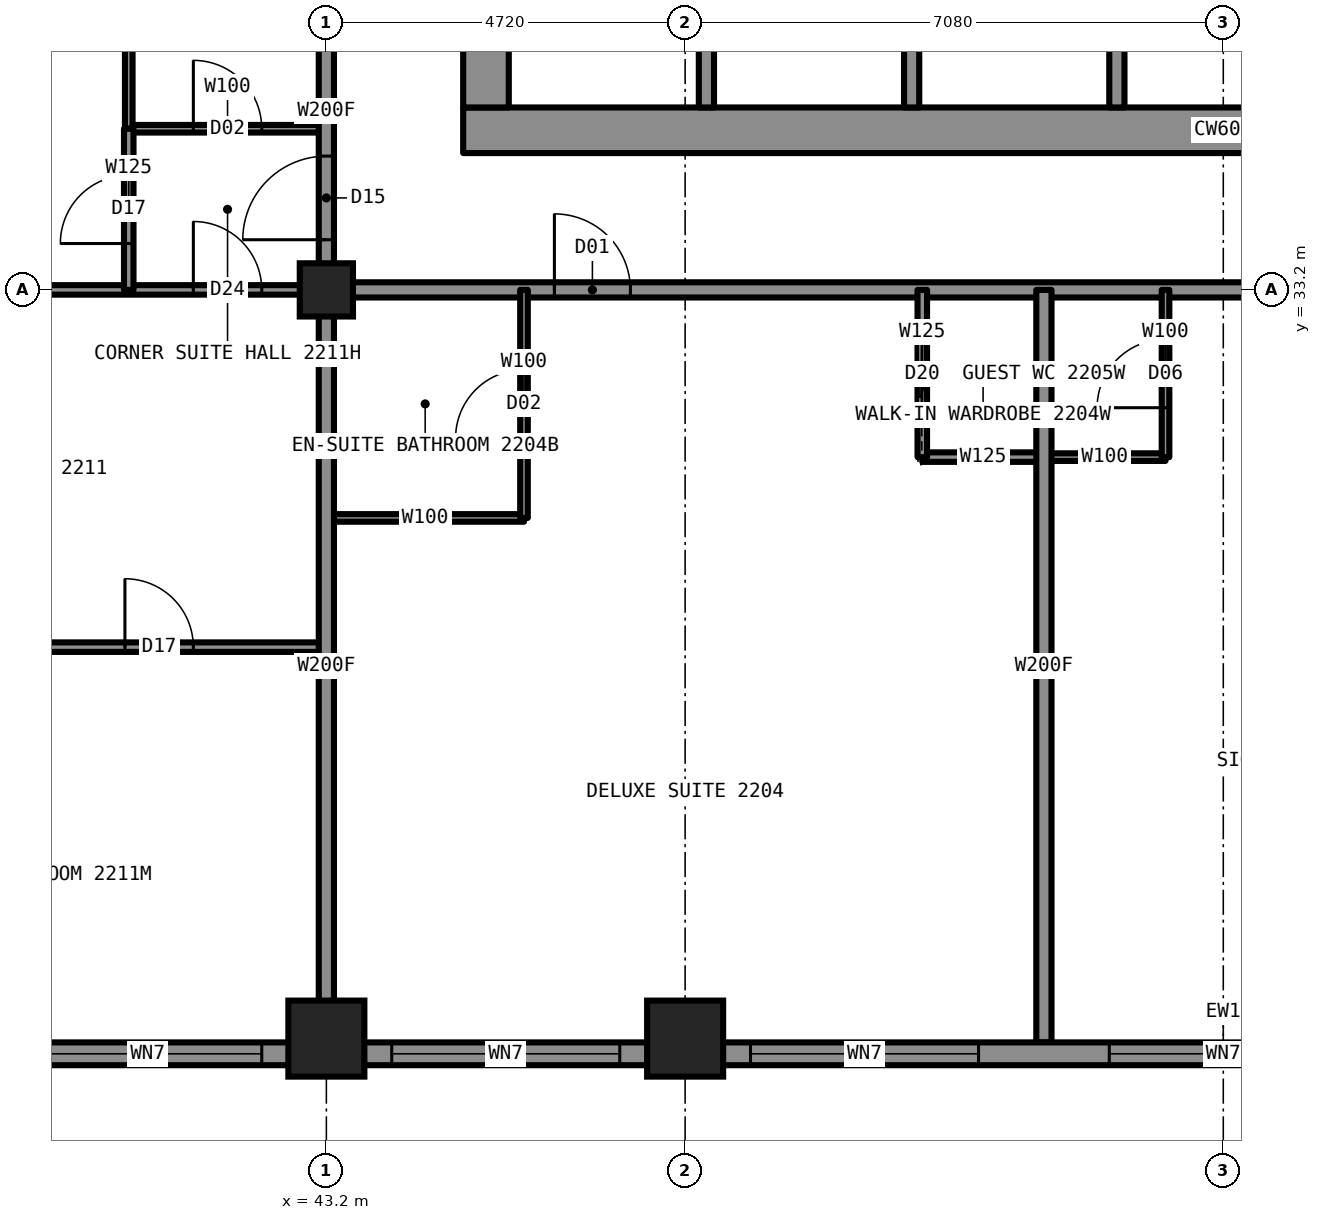
"""IFC4 building model, lengths in metres.
Left out: names, types, materials, properties, quantities, classifications, styles, units other than length and angle.
Written with IfcOpenShell. Run it as: python <this file> out.ifc"""

import sys

from ifc_helpers import new_model, si_unit, direction, frame, frame_2d, origin, origin_2d, place, context, subcontext, project, spatial, rectangle, hollow_rectangle, i_section, extrude, element, fill, save


model = new_model("IFC4")
c1 = context("Model", 3, precision=1e-05, world=origin(), true_north=direction((0.0, 1.0)))
c2 = subcontext(c1, "Body", "Model", "MODEL_VIEW")
j1 = project(units=[si_unit("LENGTHUNIT", "METRE"), si_unit("PLANEANGLEUNIT", "RADIAN")], contexts=[c1])
p1 = place(None, origin())
s1 = spatial("IfcSite", under=j1, at=p1, CompositionType="ELEMENT")
p2 = place(p1, origin())
s2 = spatial("IfcBuilding", under=s1, at=p2, CompositionType="ELEMENT")
p3 = place(p2, frame((0.0, 0.0, 81.0)))
s3 = spatial("IfcBuildingStorey", under=s2, at=p3, CompositionType="ELEMENT", Elevation=81.0)
for number, where, z_axis, x_axis in (
    (1, (43.2, 23.35, 0.0), (0.0, 0.0, 1.0), (1.0, 0.0, 0.0)),
    (2, (47.92, 23.35, 0.0), (0.0, 0.0, 1.0), (1.0, 0.0, 0.0)),
):
    element("IfcColumn", number, at=place(p3, frame(where, z_axis=z_axis, x_axis=x_axis)), inside=s3, PredefinedType="COLUMN", context=c2, shape_type="SweptSolid", body=[
        extrude(i_section(OverallWidth=0.432, OverallDepth=0.498, WebThickness=0.056, FlangeThickness=0.089, at=origin_2d()), origin(), (0.0, 0.0, 1.0), 3.5),
    ])
p4 = place(p3, frame((43.2, 33.2, 0.0), z_axis=(0.0, 0.0, 1.0), x_axis=(1.0, 0.0, 0.0)))
e3 = element("IfcColumn", 3, at=p4, inside=s3, PredefinedType="COLUMN", context=c2, shape_type="SweptSolid", body=[
    extrude(hollow_rectangle(XDim=0.7, YDim=0.7, WallThickness=0.06, at=origin_2d()), origin(), (0.0, 0.0, 1.0), 3.5),
])
p5 = place(p3, frame((45.0, 35.3, 0.0), z_axis=(0.0, 0.0, 1.0), x_axis=(1.0, 0.0, 0.0)))
e4 = element("IfcWall", 4, at=p5, inside=s3, PredefinedType="SHEAR", context=c2, shape_type="SweptSolid", body=[
    extrude(rectangle(XDim=20.0, YDim=0.6, at=frame_2d((10.0, 0.0))), origin(), (0.0, 0.0, 1.0), 3.5),
])
p6 = place(p3, frame((45.3, 35.6, 0.0), z_axis=(0.0, 0.0, 1.0), x_axis=(0.0, 1.0, 0.0)))
e5 = element("IfcWall", 5, at=p6, inside=s3, PredefinedType="SHEAR", context=c2, shape_type="SweptSolid", body=[
    extrude(rectangle(XDim=18.8, YDim=0.6, at=frame_2d((9.4, 0.0))), origin(), (0.0, 0.0, 1.0), 3.5),
])
p7 = place(p6, frame((13.4, 0.0, 0.0)))
e6 = element("IfcOpeningElement", 6, at=p7, cuts=e5, PredefinedType="OPENING", context=c2, shape_type="SweptSolid", body=[
    extrude(rectangle(XDim=1.8, YDim=2.2, at=frame_2d((0.9, 1.1))), frame((0.0, 0.31, 0.0), z_axis=(0.0, -1.0, 0.0), x_axis=(1.0, 0.0, 0.0)), (0.0, 0.0, 1.0), 0.62),
])
p8 = place(p6, frame((3.6, 0.0, 0.0)))
e7 = element("IfcOpeningElement", 7, at=p8, cuts=e5, PredefinedType="OPENING", context=c2, shape_type="SweptSolid", body=[
    extrude(rectangle(XDim=1.8, YDim=2.2, at=frame_2d((0.9, 1.1))), frame((0.0, 0.31, 0.0), z_axis=(0.0, -1.0, 0.0), x_axis=(1.0, 0.0, 0.0)), (0.0, 0.0, 1.0), 0.62),
])
p9 = place(p6, frame((6.4, 0.0, 0.0)))
e8 = element("IfcOpeningElement", 8, at=p9, cuts=e5, PredefinedType="OPENING", context=c2, shape_type="SweptSolid", body=[
    extrude(rectangle(XDim=1.2, YDim=2.2, at=frame_2d((0.6, 1.1))), frame((0.0, 0.31, 0.0), z_axis=(0.0, -1.0, 0.0), x_axis=(1.0, 0.0, 0.0)), (0.0, 0.0, 1.0), 0.62),
])
p10 = place(p3, frame((43.2, 33.2, 0.0), z_axis=(0.0, 0.0, 1.0), x_axis=(1.0, 0.0, 0.0)))
e9 = element("IfcWall", 9, at=p10, inside=s3, PredefinedType="PARTITIONING", context=c2, shape_type="SweptSolid", body=[
    extrude(rectangle(XDim=23.6, YDim=0.2, at=frame_2d((11.8, 0.0))), origin(), (0.0, 0.0, 1.0), 3.33),
])
p11 = place(p10, frame((3.0, 0.0, 0.0)))
e10 = element("IfcOpeningElement", 10, at=p11, cuts=e9, PredefinedType="OPENING", context=c2, shape_type="SweptSolid", body=[
    extrude(rectangle(XDim=1.0, YDim=2.2, at=frame_2d((0.5, 1.1))), frame((0.0, 0.11, 0.0), z_axis=(0.0, -1.0, 0.0), x_axis=(1.0, 0.0, 0.0)), (0.0, 0.0, 1.0), 0.22),
])
p12 = place(p10, frame((11.29, 0.0, 0.0)))
e11 = element("IfcOpeningElement", 11, at=p12, cuts=e9, PredefinedType="OPENING", context=c2, shape_type="SweptSolid", body=[
    extrude(rectangle(XDim=1.1, YDim=2.2, at=frame_2d((0.55, 1.1))), frame((0.0, 0.11, 0.0), z_axis=(0.0, -1.0, 0.0), x_axis=(1.0, 0.0, 0.0)), (0.0, 0.0, 1.0), 0.22),
])
p13 = place(p3, frame((33.3, 33.2, 0.0), z_axis=(0.0, 0.0, 1.0), x_axis=(1.0, 0.0, 0.0)))
e12 = element("IfcWall", 12, at=p13, inside=s3, PredefinedType="PARTITIONING", context=c2, shape_type="SweptSolid", body=[
    extrude(rectangle(XDim=9.9, YDim=0.125, at=frame_2d((4.95, 0.0))), origin(), (0.0, 0.0, 1.0), 2.573),
])
p14 = place(p13, frame((8.15, 0.0, 0.0)))
e13 = element("IfcOpeningElement", 13, at=p14, cuts=e12, PredefinedType="OPENING", context=c2, shape_type="SweptSolid", body=[
    extrude(rectangle(XDim=0.9, YDim=2.2, at=frame_2d((0.45, 1.1))), frame((0.0, 0.073, 0.0), z_axis=(0.0, -1.0, 0.0), x_axis=(1.0, 0.0, 0.0)), (0.0, 0.0, 1.0), 0.145),
])
p15 = place(p3, frame((52.64, 31.0, 0.0), z_axis=(0.0, 0.0, 1.0), x_axis=(1.0, 0.0, 0.0)))
e14 = element("IfcWall", 14, at=p15, inside=s3, PredefinedType="PARTITIONING", context=c2, shape_type="SweptSolid", body=[
    extrude(rectangle(XDim=1.6, YDim=0.1, at=frame_2d((0.8, 0.0))), origin(), (0.0, 0.0, 1.0), 3.33),
])
p16 = place(p3, frame((51.04, 31.0, 0.0), z_axis=(0.0, 0.0, 1.0), x_axis=(1.0, 0.0, 0.0)))
e15 = element("IfcWall", 15, at=p16, inside=s3, PredefinedType="PARTITIONING", context=c2, shape_type="SweptSolid", body=[
    extrude(rectangle(XDim=1.6, YDim=0.125, at=frame_2d((0.8, 0.0))), origin(), (0.0, 0.0, 1.0), 3.33),
])
p17 = place(p3, frame((43.2, 30.2, 0.0), z_axis=(0.0, 0.0, 1.0), x_axis=(1.0, 0.0, 0.0)))
e16 = element("IfcWall", 16, at=p17, inside=s3, PredefinedType="PARTITIONING", context=c2, shape_type="SweptSolid", body=[
    extrude(rectangle(XDim=2.6, YDim=0.1, at=frame_2d((1.3, 0.0))), origin(), (0.0, 0.0, 1.0), 3.33),
])
p18 = place(p3, frame((33.306, 28.5, 0.0), z_axis=(0.0, 0.0, 1.0), x_axis=(1.0, 0.0, 0.0)))
e17 = element("IfcWall", 17, at=p18, inside=s3, PredefinedType="PARTITIONING", context=c2, shape_type="SweptSolid", body=[
    extrude(rectangle(XDim=9.894, YDim=0.125, at=frame_2d((4.947, 0.0))), origin(), (0.0, 0.0, 1.0), 3.33),
])
p19 = place(p18, frame((7.244, 0.0, 0.0)))
e18 = element("IfcOpeningElement", 18, at=p19, cuts=e17, PredefinedType="OPENING", context=c2, shape_type="SweptSolid", body=[
    extrude(rectangle(XDim=0.9, YDim=2.2, at=frame_2d((0.45, 1.1))), frame((0.0, 0.073, 0.0), z_axis=(0.0, -1.0, 0.0), x_axis=(1.0, 0.0, 0.0)), (0.0, 0.0, 1.0), 0.145),
])
p20 = place(p3, frame((40.6, 35.32, 0.0), z_axis=(0.0, 0.0, 1.0), x_axis=(1.0, 0.0, 0.0)))
e19 = element("IfcWall", 19, at=p20, inside=s3, PredefinedType="PARTITIONING", context=c2, shape_type="SweptSolid", body=[
    extrude(rectangle(XDim=2.6, YDim=0.1, at=frame_2d((1.3, 0.0))), origin(), (0.0, 0.0, 1.0), 3.33),
])
p21 = place(p20, frame((0.85, 0.0, 0.0)))
e20 = element("IfcOpeningElement", 20, at=p21, cuts=e19, PredefinedType="OPENING", context=c2, shape_type="SweptSolid", body=[
    extrude(rectangle(XDim=0.9, YDim=2.1, at=frame_2d((0.45, 1.05))), frame((0.0, 0.06, 0.0), z_axis=(0.0, -1.0, 0.0), x_axis=(1.0, 0.0, 0.0)), (0.0, 0.0, 1.0), 0.12),
])
p22 = place(p3, frame((54.24, 31.0, 0.0), z_axis=(0.0, 0.0, 1.0), x_axis=(0.0, 1.0, 0.0)))
e21 = element("IfcWall", 21, at=p22, inside=s3, PredefinedType="PARTITIONING", context=c2, shape_type="SweptSolid", body=[
    extrude(rectangle(XDim=2.2, YDim=0.1, at=frame_2d((1.1, 0.0))), origin(), (0.0, 0.0, 1.0), 3.33),
])
p23 = place(p22, frame((0.65, 0.0, 0.0)))
e22 = element("IfcOpeningElement", 22, at=p23, cuts=e21, PredefinedType="OPENING", context=c2, shape_type="SweptSolid", body=[
    extrude(rectangle(XDim=0.9, YDim=2.1, at=frame_2d((0.45, 1.05))), frame((0.0, 0.06, 0.0), z_axis=(0.0, -1.0, 0.0), x_axis=(1.0, 0.0, 0.0)), (0.0, 0.0, 1.0), 0.12),
])
p24 = place(p3, frame((43.2, 33.2, 0.0), z_axis=(0.0, 0.0, 1.0), x_axis=(0.0, 1.0, 0.0)))
e23 = element("IfcWall", 23, at=p24, inside=s3, PredefinedType="PARTITIONING", context=c2, shape_type="SweptSolid", body=[
    extrude(rectangle(XDim=4.72, YDim=0.2, at=frame_2d((2.36, 0.0))), origin(), (0.0, 0.0, 1.0), 3.33),
])
p25 = place(p24, frame((0.66, 0.0, 0.0)))
e24 = element("IfcOpeningElement", 24, at=p25, cuts=e23, PredefinedType="OPENING", context=c2, shape_type="SweptSolid", body=[
    extrude(rectangle(XDim=1.1, YDim=2.2, at=frame_2d((0.55, 1.1))), frame((0.0, 0.11, 0.0), z_axis=(0.0, -1.0, 0.0), x_axis=(1.0, 0.0, 0.0)), (0.0, 0.0, 1.0), 0.22),
])
p26 = place(p3, frame((43.2, 23.3, 0.0), z_axis=(0.0, 0.0, 1.0), x_axis=(0.0, 1.0, 0.0)))
e25 = element("IfcWall", 25, at=p26, inside=s3, PredefinedType="PARTITIONING", context=c2, shape_type="SweptSolid", body=[
    extrude(rectangle(XDim=9.9, YDim=0.2, at=frame_2d((4.95, 0.0))), origin(), (0.0, 0.0, 1.0), 2.573),
])
p27 = place(p3, frame((40.6, 35.32, 0.0), z_axis=(0.0, 0.0, 1.0), x_axis=(0.0, 1.0, 0.0)))
e26 = element("IfcWall", 26, at=p27, inside=s3, PredefinedType="PARTITIONING", context=c2, shape_type="SweptSolid", body=[
    extrude(rectangle(XDim=2.6, YDim=0.1, at=frame_2d((1.3, 0.0))), origin(), (0.0, 0.0, 1.0), 3.33),
])
p28 = place(p3, frame((40.6, 33.2, 0.0), z_axis=(0.0, 0.0, 1.0), x_axis=(0.0, 1.0, 0.0)))
e27 = element("IfcWall", 27, at=p28, inside=s3, PredefinedType="PARTITIONING", context=c2, shape_type="SweptSolid", body=[
    extrude(rectangle(XDim=2.12, YDim=0.125, at=frame_2d((1.06, 0.0))), origin(), (0.0, 0.0, 1.0), 3.33),
])
p29 = place(p28, frame((0.61, 0.0, 0.0)))
e28 = element("IfcOpeningElement", 28, at=p29, cuts=e27, PredefinedType="OPENING", context=c2, shape_type="SweptSolid", body=[
    extrude(rectangle(XDim=0.9, YDim=2.2, at=frame_2d((0.45, 1.1))), frame((0.0, 0.073, 0.0), z_axis=(0.0, -1.0, 0.0), x_axis=(1.0, 0.0, 0.0)), (0.0, 0.0, 1.0), 0.145),
])
p30 = place(p3, frame((52.64, 23.3, 0.0), z_axis=(0.0, 0.0, 1.0), x_axis=(0.0, 1.0, 0.0)))
e29 = element("IfcWall", 29, at=p30, inside=s3, PredefinedType="PARTITIONING", context=c2, shape_type="SweptSolid", body=[
    extrude(rectangle(XDim=9.9, YDim=0.2, at=frame_2d((4.95, 0.0))), origin(), (0.0, 0.0, 1.0), 3.33),
])
p31 = place(p3, frame((51.04, 31.0, 0.0), z_axis=(0.0, 0.0, 1.0), x_axis=(0.0, 1.0, 0.0)))
e30 = element("IfcWall", 30, at=p31, inside=s3, PredefinedType="PARTITIONING", context=c2, shape_type="SweptSolid", body=[
    extrude(rectangle(XDim=2.2, YDim=0.125, at=frame_2d((1.1, 0.0))), origin(), (0.0, 0.0, 1.0), 3.33),
])
p32 = place(p31, frame((0.7, 0.0, 0.0)))
e31 = element("IfcOpeningElement", 31, at=p32, cuts=e30, PredefinedType="OPENING", context=c2, shape_type="SweptSolid", body=[
    extrude(rectangle(XDim=0.8, YDim=2.1, at=frame_2d((0.4, 1.05))), frame((0.0, 0.073, 0.0), z_axis=(0.0, -1.0, 0.0), x_axis=(1.0, 0.0, 0.0)), (0.0, 0.0, 1.0), 0.145),
])
p33 = place(p3, frame((45.8, 30.2, 0.0), z_axis=(0.0, 0.0, 1.0), x_axis=(0.0, 1.0, 0.0)))
e32 = element("IfcWall", 32, at=p33, inside=s3, PredefinedType="PARTITIONING", context=c2, shape_type="SweptSolid", body=[
    extrude(rectangle(XDim=3.0, YDim=0.1, at=frame_2d((1.5, 0.0))), origin(), (0.0, 0.0, 1.0), 3.33),
])
p34 = place(p33, frame((1.05, 0.0, 0.0)))
e33 = element("IfcOpeningElement", 33, at=p34, cuts=e32, PredefinedType="OPENING", context=c2, shape_type="SweptSolid", body=[
    extrude(rectangle(XDim=0.9, YDim=2.1, at=frame_2d((0.45, 1.05))), frame((0.0, 0.06, 0.0), z_axis=(0.0, -1.0, 0.0), x_axis=(1.0, 0.0, 0.0)), (0.0, 0.0, 1.0), 0.12),
])
p35 = place(p3, frame((38.5, 23.15, 0.0), z_axis=(0.0, 0.0, 1.0), x_axis=(1.0, 0.0, 0.0)))
e34 = element("IfcWall", 34, at=p35, inside=s3, PredefinedType="SOLIDWALL", context=c2, shape_type="SweptSolid", body=[
    extrude(rectangle(XDim=33.0, YDim=0.3, at=frame_2d((16.5, 0.0))), origin(), (0.0, 0.0, 1.0), 2.63),
])
p36 = place(p35, frame((0.85, 0.0, 0.5)))
e35 = element("IfcOpeningElement", 35, at=p36, cuts=e34, PredefinedType="OPENING", context=c2, shape_type="SweptSolid", body=[
    extrude(rectangle(XDim=3.0, YDim=2.0, at=frame_2d((1.5, 1.0))), frame((0.0, 0.16, 0.0), z_axis=(0.0, -1.0, 0.0), x_axis=(1.0, 0.0, 0.0)), (0.0, 0.0, 1.0), 0.32),
])
p37 = place(p35, frame((5.56, 0.0, 0.5)))
e36 = element("IfcOpeningElement", 36, at=p37, cuts=e34, PredefinedType="OPENING", context=c2, shape_type="SweptSolid", body=[
    extrude(rectangle(XDim=3.0, YDim=2.0, at=frame_2d((1.5, 1.0))), frame((0.0, 0.16, 0.0), z_axis=(0.0, -1.0, 0.0), x_axis=(1.0, 0.0, 0.0)), (0.0, 0.0, 1.0), 0.32),
])
p38 = place(p35, frame((10.28, 0.0, 0.5)))
e37 = element("IfcOpeningElement", 37, at=p38, cuts=e34, PredefinedType="OPENING", context=c2, shape_type="SweptSolid", body=[
    extrude(rectangle(XDim=3.0, YDim=2.0, at=frame_2d((1.5, 1.0))), frame((0.0, 0.16, 0.0), z_axis=(0.0, -1.0, 0.0), x_axis=(1.0, 0.0, 0.0)), (0.0, 0.0, 1.0), 0.32),
])
p39 = place(p35, frame((15.0, 0.0, 0.5)))
e38 = element("IfcOpeningElement", 38, at=p39, cuts=e34, PredefinedType="OPENING", context=c2, shape_type="SweptSolid", body=[
    extrude(rectangle(XDim=3.0, YDim=2.0, at=frame_2d((1.5, 1.0))), frame((0.0, 0.16, 0.0), z_axis=(0.0, -1.0, 0.0), x_axis=(1.0, 0.0, 0.0)), (0.0, 0.0, 1.0), 0.32),
])
p40 = place(p35, frame((19.72, 0.0, 0.5)))
e39 = element("IfcOpeningElement", 39, at=p40, cuts=e34, PredefinedType="OPENING", context=c2, shape_type="SweptSolid", body=[
    extrude(rectangle(XDim=3.0, YDim=2.0, at=frame_2d((1.5, 1.0))), frame((0.0, 0.16, 0.0), z_axis=(0.0, -1.0, 0.0), x_axis=(1.0, 0.0, 0.0)), (0.0, 0.0, 1.0), 0.32),
])
p41 = place(p35, frame((24.44, 0.0, 0.5)))
e40 = element("IfcOpeningElement", 40, at=p41, cuts=e34, PredefinedType="OPENING", context=c2, shape_type="SweptSolid", body=[
    extrude(rectangle(XDim=3.0, YDim=2.0, at=frame_2d((1.5, 1.0))), frame((0.0, 0.16, 0.0), z_axis=(0.0, -1.0, 0.0), x_axis=(1.0, 0.0, 0.0)), (0.0, 0.0, 1.0), 0.32),
])
p42 = place(p35, frame((29.15, 0.0, 0.5)))
e41 = element("IfcOpeningElement", 41, at=p42, cuts=e34, PredefinedType="OPENING", context=c2, shape_type="SweptSolid", body=[
    extrude(rectangle(XDim=3.0, YDim=2.0, at=frame_2d((1.5, 1.0))), frame((0.0, 0.16, 0.0), z_axis=(0.0, -1.0, 0.0), x_axis=(1.0, 0.0, 0.0)), (0.0, 0.0, 1.0), 0.32),
])
for number, where, z_axis, x_axis in (
    (42, (48.2, 35.6, 0.0), (0.0, 0.0, 1.0), (0.0, 1.0, 0.0)),
    (43, (50.9, 35.6, 0.0), (0.0, 0.0, 1.0), (0.0, 1.0, 0.0)),
    (44, (53.6, 35.6, 0.0), (0.0, 0.0, 1.0), (0.0, 1.0, 0.0)),
):
    element("IfcWall", number, at=place(p3, frame(where, z_axis=z_axis, x_axis=x_axis)), inside=s3, PredefinedType="PARTITIONING", context=c2, shape_type="SweptSolid", body=[
        extrude(rectangle(XDim=2.7, YDim=0.2, at=frame_2d((1.35, 0.0))), origin(), (0.0, 0.0, 1.0), 3.33),
    ])
p43 = place(p11, origin())
e45 = element("IfcDoor", 45, at=p43, inside=s3, OperationType="SINGLE_SWING_LEFT", PredefinedType="DOOR", context=c2, shape_type="SweptSolid", body=[
    extrude(rectangle(XDim=1.0, YDim=2.2, at=frame_2d((0.5, 1.1))), frame((0.0, 0.025, 0.0), z_axis=(0.0, -1.0, 0.0), x_axis=(1.0, 0.0, 0.0)), (0.0, 0.0, 1.0), 0.05),
])
fill(e10, e45)
p44 = place(p34, origin())
e46 = element("IfcDoor", 46, at=p44, inside=s3, OperationType="SINGLE_SWING_RIGHT", PredefinedType="DOOR", context=c2, shape_type="SweptSolid", body=[
    extrude(rectangle(XDim=0.9, YDim=2.1, at=frame_2d((0.45, 1.05))), frame((0.0, 0.025, 0.0), z_axis=(0.0, -1.0, 0.0), x_axis=(1.0, 0.0, 0.0)), (0.0, 0.0, 1.0), 0.05),
])
fill(e33, e46)
p45 = place(p32, origin())
e47 = element("IfcDoor", 47, at=p45, inside=s3, OperationType="SLIDING_TO_LEFT", PredefinedType="DOOR", context=c2, shape_type="SweptSolid", body=[
    extrude(rectangle(XDim=0.8, YDim=2.1, at=frame_2d((0.4, 1.05))), frame((0.0, 0.025, 0.0), z_axis=(0.0, -1.0, 0.0), x_axis=(1.0, 0.0, 0.0)), (0.0, 0.0, 1.0), 0.05),
])
fill(e31, e47)
p46 = place(p12, origin())
e48 = element("IfcDoor", 48, at=p46, inside=s3, OperationType="SINGLE_SWING_LEFT", PredefinedType="DOOR", context=c2, shape_type="SweptSolid", body=[
    extrude(rectangle(XDim=1.1, YDim=2.2, at=frame_2d((0.55, 1.1))), frame((0.0, 0.025, 0.0), z_axis=(0.0, -1.0, 0.0), x_axis=(1.0, 0.0, 0.0)), (0.0, 0.0, 1.0), 0.05),
])
fill(e11, e48)
p47 = place(p23, origin())
e49 = element("IfcDoor", 49, at=p47, inside=s3, OperationType="SINGLE_SWING_LEFT", PredefinedType="DOOR", context=c2, shape_type="SweptSolid", body=[
    extrude(rectangle(XDim=0.9, YDim=2.1, at=frame_2d((0.45, 1.05))), frame((0.0, 0.025, 0.0), z_axis=(0.0, -1.0, 0.0), x_axis=(1.0, 0.0, 0.0)), (0.0, 0.0, 1.0), 0.05),
])
fill(e22, e49)
p48 = place(p14, origin())
e50 = element("IfcDoor", 50, at=p48, inside=s3, OperationType="SINGLE_SWING_LEFT", PredefinedType="DOOR", context=c2, shape_type="SweptSolid", body=[
    extrude(rectangle(XDim=0.9, YDim=2.2, at=frame_2d((0.45, 1.1))), frame((0.0, 0.025, 0.0), z_axis=(0.0, -1.0, 0.0), x_axis=(1.0, 0.0, 0.0)), (0.0, 0.0, 1.0), 0.05),
])
fill(e13, e50)
p49 = place(p21, origin())
e51 = element("IfcDoor", 51, at=p49, inside=s3, OperationType="SINGLE_SWING_RIGHT", PredefinedType="DOOR", context=c2, shape_type="SweptSolid", body=[
    extrude(rectangle(XDim=0.9, YDim=2.1, at=frame_2d((0.45, 1.05))), frame((0.0, 0.025, 0.0), z_axis=(0.0, -1.0, 0.0), x_axis=(1.0, 0.0, 0.0)), (0.0, 0.0, 1.0), 0.05),
])
fill(e20, e51)
p50 = place(p25, origin())
e52 = element("IfcDoor", 52, at=p50, inside=s3, OperationType="SINGLE_SWING_LEFT", PredefinedType="DOOR", context=c2, shape_type="SweptSolid", body=[
    extrude(rectangle(XDim=1.1, YDim=2.2, at=frame_2d((0.55, 1.1))), frame((0.0, 0.025, 0.0), z_axis=(0.0, -1.0, 0.0), x_axis=(1.0, 0.0, 0.0)), (0.0, 0.0, 1.0), 0.05),
])
fill(e24, e52)
p51 = place(p19, origin())
e53 = element("IfcDoor", 53, at=p51, inside=s3, OperationType="SINGLE_SWING_LEFT", PredefinedType="DOOR", context=c2, shape_type="SweptSolid", body=[
    extrude(rectangle(XDim=0.9, YDim=2.2, at=frame_2d((0.45, 1.1))), frame((0.0, 0.025, 0.0), z_axis=(0.0, -1.0, 0.0), x_axis=(1.0, 0.0, 0.0)), (0.0, 0.0, 1.0), 0.05),
])
fill(e18, e53)
p52 = place(p29, origin())
e54 = element("IfcDoor", 54, at=p52, inside=s3, OperationType="SINGLE_SWING_LEFT", PredefinedType="DOOR", context=c2, shape_type="SweptSolid", body=[
    extrude(rectangle(XDim=0.9, YDim=2.2, at=frame_2d((0.45, 1.1))), frame((0.0, 0.025, 0.0), z_axis=(0.0, -1.0, 0.0), x_axis=(1.0, 0.0, 0.0)), (0.0, 0.0, 1.0), 0.05),
])
fill(e28, e54)
p53 = place(p36, origin())
e55 = element("IfcWindow", 55, at=p53, inside=s3, PartitioningType="SINGLE_PANEL", PredefinedType="WINDOW", context=c2, shape_type="SweptSolid", body=[
    extrude(rectangle(XDim=3.0, YDim=2.0, at=frame_2d((1.5, 1.0))), frame((0.0, 0.03, 0.0), z_axis=(0.0, -1.0, 0.0), x_axis=(1.0, 0.0, 0.0)), (0.0, 0.0, 1.0), 0.06),
])
fill(e35, e55)
p54 = place(p37, origin())
e56 = element("IfcWindow", 56, at=p54, inside=s3, PartitioningType="SINGLE_PANEL", PredefinedType="WINDOW", context=c2, shape_type="SweptSolid", body=[
    extrude(rectangle(XDim=3.0, YDim=2.0, at=frame_2d((1.5, 1.0))), frame((0.0, 0.03, 0.0), z_axis=(0.0, -1.0, 0.0), x_axis=(1.0, 0.0, 0.0)), (0.0, 0.0, 1.0), 0.06),
])
fill(e36, e56)
p55 = place(p38, origin())
e57 = element("IfcWindow", 57, at=p55, inside=s3, PartitioningType="SINGLE_PANEL", PredefinedType="WINDOW", context=c2, shape_type="SweptSolid", body=[
    extrude(rectangle(XDim=3.0, YDim=2.0, at=frame_2d((1.5, 1.0))), frame((0.0, 0.03, 0.0), z_axis=(0.0, -1.0, 0.0), x_axis=(1.0, 0.0, 0.0)), (0.0, 0.0, 1.0), 0.06),
])
fill(e37, e57)
p56 = place(p39, origin())
e58 = element("IfcWindow", 58, at=p56, inside=s3, PartitioningType="SINGLE_PANEL", PredefinedType="WINDOW", context=c2, shape_type="SweptSolid", body=[
    extrude(rectangle(XDim=3.0, YDim=2.0, at=frame_2d((1.5, 1.0))), frame((0.0, 0.03, 0.0), z_axis=(0.0, -1.0, 0.0), x_axis=(1.0, 0.0, 0.0)), (0.0, 0.0, 1.0), 0.06),
])
fill(e38, e58)
save(model, sys.argv[1])
